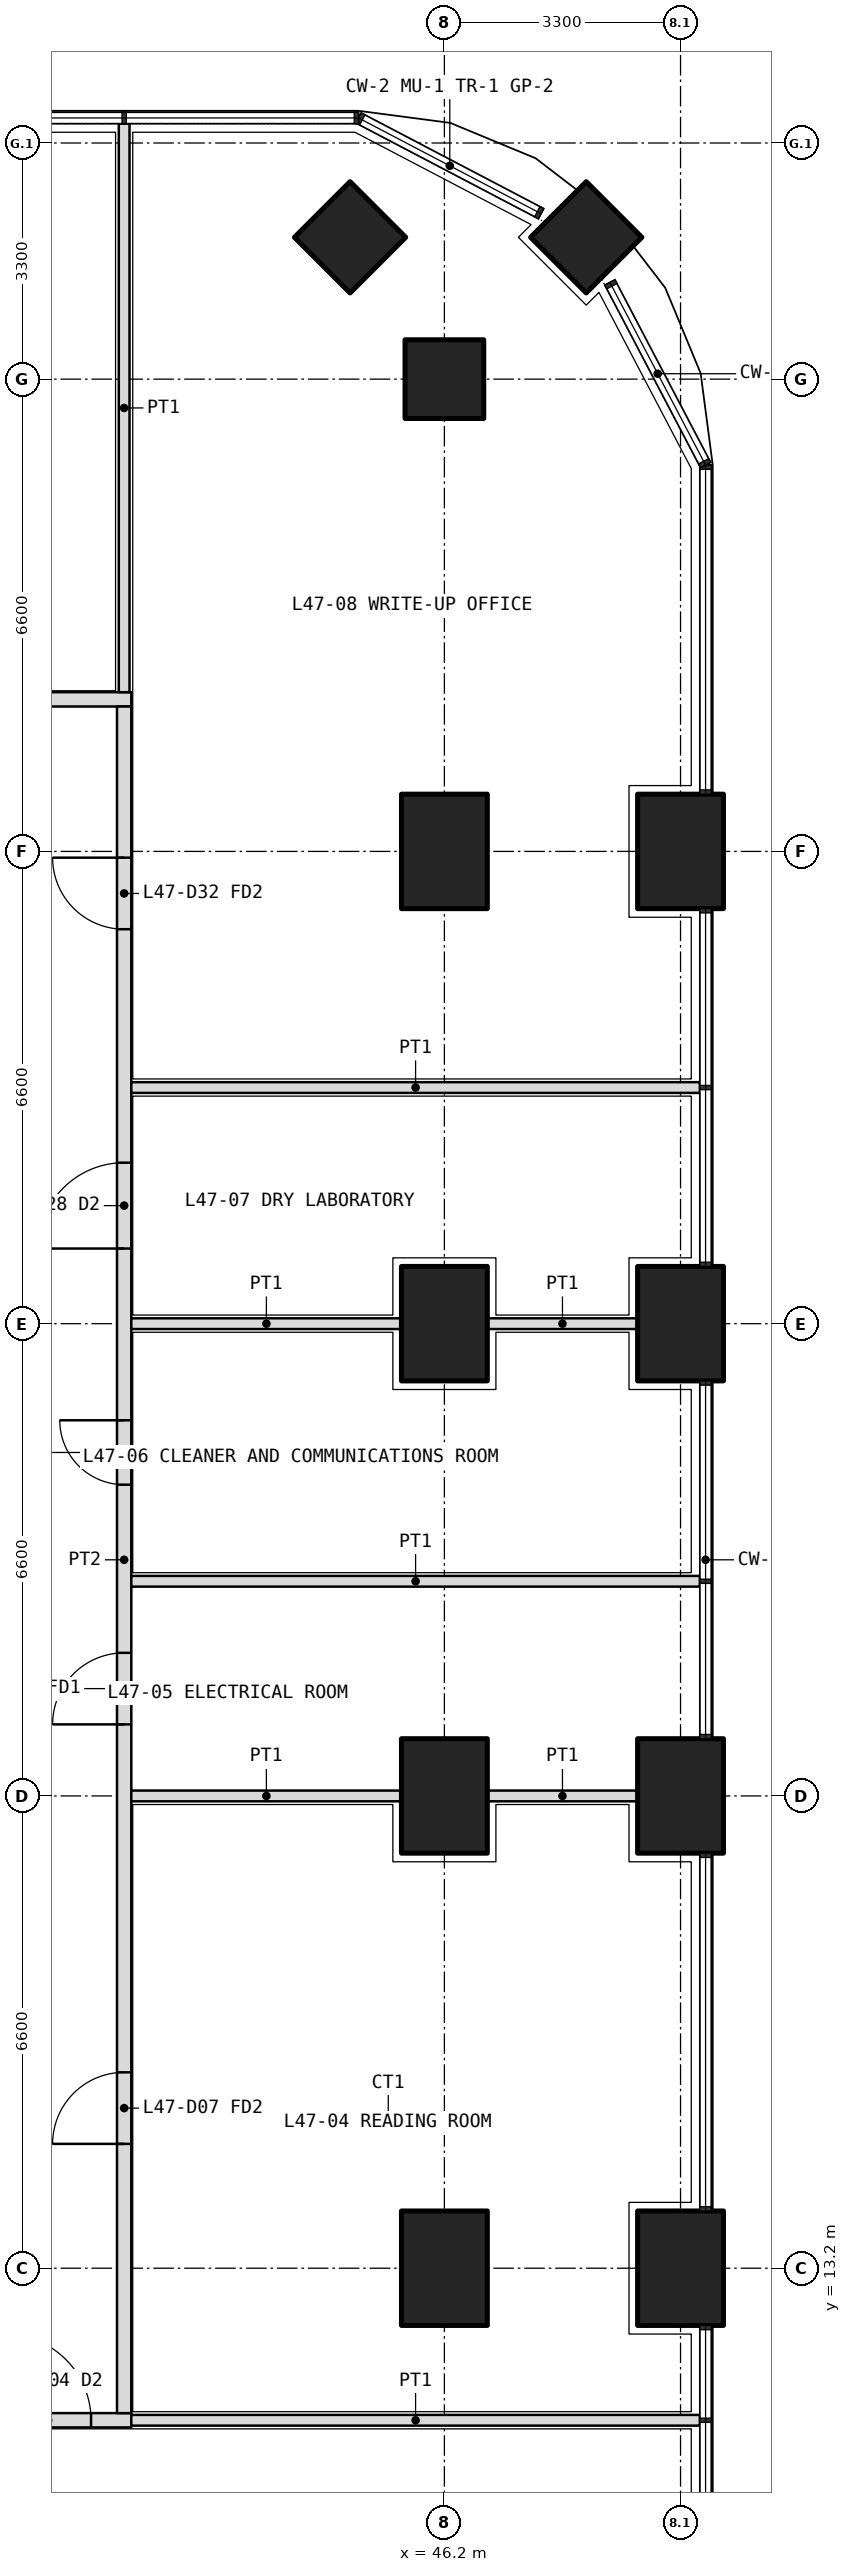
"""IFC4 building model, lengths in metres.
Left out: names, types, materials, properties, quantities, classifications, styles, units other than length and angle.
Written with IfcOpenShell. Run it as: python <this file> out.ifc"""

import sys

from ifc_helpers import new_model, si_unit, direction, frame, frame_2d, origin, origin_2d, place, context, subcontext, project, spatial, rectangle, extrude, element, fill, save


model = new_model("IFC4")
c1 = context("Model", 3, precision=1e-05, world=origin(), true_north=direction((0.0, 1.0)))
c2 = subcontext(c1, "Body", "Model", "MODEL_VIEW")
j1 = project(units=[si_unit("LENGTHUNIT", "METRE"), si_unit("PLANEANGLEUNIT", "RADIAN")], contexts=[c1])
p1 = place(None, origin())
s1 = spatial("IfcSite", under=j1, at=p1, CompositionType="ELEMENT")
p2 = place(p1, origin())
s2 = spatial("IfcBuilding", under=s1, at=p2, CompositionType="ELEMENT")
p3 = place(p2, frame((0.0, 0.0, 206.1)))
s3 = spatial("IfcBuildingStorey", under=s2, at=p3, CompositionType="ELEMENT", Elevation=206.1)
p4 = place(p3, frame((48.182, 41.582, 0.0), z_axis=(0.0, 0.0, 1.0), x_axis=(0.707106781187, 0.707106781187, 0.0)))
e1 = element("IfcColumn", 1, at=p4, inside=s3, PredefinedType="COLUMN", context=c2, shape_type="SweptSolid", body=[
    extrude(rectangle(XDim=1.1, YDim=1.1, at=origin_2d()), origin(), (0.0, 0.0, 1.0), 4.2),
])
for number, where, z_axis, x_axis in (
    (2, (49.5, 13.2, 0.0), (0.0, 0.0, 1.0), (0.0, 1.0, 0.0)),
    (3, (49.5, 19.8, 0.0), (0.0, 0.0, 1.0), (0.0, 1.0, 0.0)),
    (4, (49.5, 26.4, 0.0), (0.0, 0.0, 1.0), (0.0, 1.0, 0.0)),
    (5, (49.5, 33.0, 0.0), (0.0, 0.0, 1.0), (0.0, 1.0, 0.0)),
):
    element("IfcColumn", number, at=place(p3, frame(where, z_axis=z_axis, x_axis=x_axis)), inside=s3, PredefinedType="COLUMN", context=c2, shape_type="SweptSolid", body=[
        extrude(rectangle(XDim=1.6, YDim=1.2, at=origin_2d()), origin(), (0.0, 0.0, 1.0), 4.2),
    ])
for number, where, z_axis, x_axis in (
    (6, (46.2, 39.6, 0.0), (0.0, 0.0, 1.0), (1.0, 0.0, 0.0)),
    (7, (44.882, 41.582, 0.0), (0.0, 0.0, 1.0), (0.707, 0.707, 0.0)),
):
    element("IfcColumn", number, at=place(p3, frame(where, z_axis=z_axis, x_axis=x_axis)), inside=s3, PredefinedType="COLUMN", context=c2, shape_type="SweptSolid", body=[
        extrude(rectangle(XDim=1.1, YDim=1.1, at=origin_2d()), origin(), (0.0, 0.0, 1.0), 4.2),
    ])
for number, where, z_axis, x_axis in (
    (8, (46.2, 13.2, 0.0), (0.0, 0.0, 1.0), (0.0, 1.0, 0.0)),
    (9, (46.2, 19.8, 0.0), (0.0, 0.0, 1.0), (0.0, 1.0, 0.0)),
    (10, (46.2, 26.4, 0.0), (0.0, 0.0, 1.0), (0.0, 1.0, 0.0)),
    (11, (46.2, 33.0, 0.0), (0.0, 0.0, 1.0), (0.0, 1.0, 0.0)),
):
    element("IfcColumn", number, at=place(p3, frame(where, z_axis=z_axis, x_axis=x_axis)), inside=s3, PredefinedType="COLUMN", context=c2, shape_type="SweptSolid", body=[
        extrude(rectangle(XDim=1.6, YDim=1.2, at=origin_2d()), origin(), (0.0, 0.0, 1.0), 4.2),
    ])
p5 = place(p3, frame((10.975, 11.075, 0.0), z_axis=(0.0, 0.0, 1.0), x_axis=(1.0, 0.0, 0.0)))
e12 = element("IfcWall", 12, at=p5, inside=s3, PredefinedType="PARTITIONING", context=c2, shape_type="SweptSolid", body=[
    extrude(rectangle(XDim=30.85, YDim=0.2, at=frame_2d((15.425, 0.0))), origin(), (0.0, 0.0, 1.0), 2.85),
])
p6 = place(p5, frame((2.212, 0.0, 0.0)))
e13 = element("IfcOpeningElement", 13, at=p6, cuts=e12, PredefinedType="OPENING", context=c2, shape_type="SweptSolid", body=[
    extrude(rectangle(XDim=1.2, YDim=2.1, at=frame_2d((0.6, 1.05))), frame((0.0, 0.11, 0.0), z_axis=(0.0, -1.0, 0.0), x_axis=(1.0, 0.0, 0.0)), (0.0, 0.0, 1.0), 0.22),
])
p7 = place(p5, frame((16.475, 0.0, 0.0)))
e14 = element("IfcOpeningElement", 14, at=p7, cuts=e12, PredefinedType="OPENING", context=c2, shape_type="SweptSolid", body=[
    extrude(rectangle(XDim=1.2, YDim=2.1, at=frame_2d((0.6, 1.05))), frame((0.0, 0.11, 0.0), z_axis=(0.0, -1.0, 0.0), x_axis=(1.0, 0.0, 0.0)), (0.0, 0.0, 1.0), 0.22),
])
p8 = place(p5, frame((29.087, 0.0, 0.0)))
e15 = element("IfcOpeningElement", 15, at=p8, cuts=e12, PredefinedType="OPENING", context=c2, shape_type="SweptSolid", body=[
    extrude(rectangle(XDim=1.2, YDim=2.1, at=frame_2d((0.6, 1.05))), frame((0.0, 0.11, 0.0), z_axis=(0.0, -1.0, 0.0), x_axis=(1.0, 0.0, 0.0)), (0.0, 0.0, 1.0), 0.22),
])
p9 = place(p3, frame((10.975, 35.125, 0.0), z_axis=(0.0, 0.0, 1.0), x_axis=(1.0, 0.0, 0.0)))
e16 = element("IfcWall", 16, at=p9, inside=s3, PredefinedType="PARTITIONING", context=c2, shape_type="SweptSolid", body=[
    extrude(rectangle(XDim=30.85, YDim=0.2, at=frame_2d((15.425, 0.0))), origin(), (0.0, 0.0, 1.0), 2.85),
])
p10 = place(p9, frame((0.562, 0.0, 0.0)))
e17 = element("IfcOpeningElement", 17, at=p10, cuts=e16, PredefinedType="OPENING", context=c2, shape_type="SweptSolid", body=[
    extrude(rectangle(XDim=1.2, YDim=2.1, at=frame_2d((0.6, 1.05))), frame((0.0, 0.11, 0.0), z_axis=(0.0, -1.0, 0.0), x_axis=(1.0, 0.0, 0.0)), (0.0, 0.0, 1.0), 0.22),
])
p11 = place(p9, frame((3.825, 0.0, 0.0)))
e18 = element("IfcOpeningElement", 18, at=p11, cuts=e16, PredefinedType="OPENING", context=c2, shape_type="SweptSolid", body=[
    extrude(rectangle(XDim=1.0, YDim=2.1, at=frame_2d((0.5, 1.05))), frame((0.0, 0.11, 0.0), z_axis=(0.0, -1.0, 0.0), x_axis=(1.0, 0.0, 0.0)), (0.0, 0.0, 1.0), 0.22),
])
p12 = place(p9, frame((7.125, 0.0, 0.0)))
e19 = element("IfcOpeningElement", 19, at=p12, cuts=e16, PredefinedType="OPENING", context=c2, shape_type="SweptSolid", body=[
    extrude(rectangle(XDim=1.0, YDim=2.1, at=frame_2d((0.5, 1.05))), frame((0.0, 0.11, 0.0), z_axis=(0.0, -1.0, 0.0), x_axis=(1.0, 0.0, 0.0)), (0.0, 0.0, 1.0), 0.22),
])
p13 = place(p9, frame((9.975, 0.0, 0.0)))
e20 = element("IfcOpeningElement", 20, at=p13, cuts=e16, PredefinedType="OPENING", context=c2, shape_type="SweptSolid", body=[
    extrude(rectangle(XDim=1.0, YDim=2.1, at=frame_2d((0.5, 1.05))), frame((0.0, 0.11, 0.0), z_axis=(0.0, -1.0, 0.0), x_axis=(1.0, 0.0, 0.0)), (0.0, 0.0, 1.0), 0.22),
])
p14 = place(p9, frame((20.938, 0.0, 0.0)))
e21 = element("IfcOpeningElement", 21, at=p14, cuts=e16, PredefinedType="OPENING", context=c2, shape_type="SweptSolid", body=[
    extrude(rectangle(XDim=1.0, YDim=2.1, at=frame_2d((0.5, 1.05))), frame((0.0, 0.11, 0.0), z_axis=(0.0, -1.0, 0.0), x_axis=(1.0, 0.0, 0.0)), (0.0, 0.0, 1.0), 0.22),
])
p15 = place(p3, frame((41.725, 11.175, 0.0), z_axis=(0.0, 0.0, 1.0), x_axis=(0.0, 1.0, 0.0)))
e22 = element("IfcWall", 22, at=p15, inside=s3, PredefinedType="PARTITIONING", context=c2, shape_type="SweptSolid", body=[
    extrude(rectangle(XDim=23.85, YDim=0.2, at=frame_2d((11.925, 0.0))), origin(), (0.0, 0.0, 1.0), 2.85),
])
p16 = place(p15, frame((3.762, 0.0, 0.0)))
e23 = element("IfcOpeningElement", 23, at=p16, cuts=e22, PredefinedType="OPENING", context=c2, shape_type="SweptSolid", body=[
    extrude(rectangle(XDim=1.0, YDim=2.1, at=frame_2d((0.5, 1.05))), frame((0.0, 0.11, 0.0), z_axis=(0.0, -1.0, 0.0), x_axis=(1.0, 0.0, 0.0)), (0.0, 0.0, 1.0), 0.22),
])
p17 = place(p15, frame((9.625, 0.0, 0.0)))
e24 = element("IfcOpeningElement", 24, at=p17, cuts=e22, PredefinedType="OPENING", context=c2, shape_type="SweptSolid", body=[
    extrude(rectangle(XDim=1.0, YDim=2.1, at=frame_2d((0.5, 1.05))), frame((0.0, 0.11, 0.0), z_axis=(0.0, -1.0, 0.0), x_axis=(1.0, 0.0, 0.0)), (0.0, 0.0, 1.0), 0.22),
])
p18 = place(p15, frame((12.975, 0.0, 0.0)))
e25 = element("IfcOpeningElement", 25, at=p18, cuts=e22, PredefinedType="OPENING", context=c2, shape_type="SweptSolid", body=[
    extrude(rectangle(XDim=0.9, YDim=2.1, at=frame_2d((0.45, 1.05))), frame((0.0, 0.11, 0.0), z_axis=(0.0, -1.0, 0.0), x_axis=(1.0, 0.0, 0.0)), (0.0, 0.0, 1.0), 0.22),
])
p19 = place(p15, frame((16.275, 0.0, 0.0)))
e26 = element("IfcOpeningElement", 26, at=p19, cuts=e22, PredefinedType="OPENING", context=c2, shape_type="SweptSolid", body=[
    extrude(rectangle(XDim=1.2, YDim=2.1, at=frame_2d((0.6, 1.05))), frame((0.0, 0.11, 0.0), z_axis=(0.0, -1.0, 0.0), x_axis=(1.0, 0.0, 0.0)), (0.0, 0.0, 1.0), 0.22),
])
p20 = place(p15, frame((20.738, 0.0, 0.0)))
e27 = element("IfcOpeningElement", 27, at=p20, cuts=e22, PredefinedType="OPENING", context=c2, shape_type="SweptSolid", body=[
    extrude(rectangle(XDim=1.0, YDim=2.1, at=frame_2d((0.5, 1.05))), frame((0.0, 0.11, 0.0), z_axis=(0.0, -1.0, 0.0), x_axis=(1.0, 0.0, 0.0)), (0.0, 0.0, 1.0), 0.22),
])
p21 = place(p3, frame((49.77, 11.075, 0.0), z_axis=(0.0, 0.0, 1.0), x_axis=(-1.0, 0.0, 0.0)))
e28 = element("IfcWall", 28, at=p21, inside=s3, PredefinedType="PARTITIONING", context=c2, shape_type="SweptSolid", body=[
    extrude(rectangle(XDim=7.945, YDim=0.15, at=frame_2d((3.973, 0.0))), origin(), (0.0, 0.0, 1.0), 2.7),
])
p22 = place(p3, frame((41.725, 43.17, 0.0), z_axis=(0.0, 0.0, 1.0), x_axis=(0.0, -1.0, 0.0)))
e29 = element("IfcWall", 29, at=p22, inside=s3, PredefinedType="PARTITIONING", context=c2, shape_type="SweptSolid", body=[
    extrude(rectangle(XDim=7.945, YDim=0.15, at=frame_2d((3.972, 0.0))), origin(), (0.0, 0.0, 1.0), 2.7),
])
p23 = place(p3, frame((49.77, 22.8, 0.0), z_axis=(0.0, 0.0, 1.0), x_axis=(-1.0, 0.0, 0.0)))
e30 = element("IfcWall", 30, at=p23, inside=s3, PredefinedType="PARTITIONING", context=c2, shape_type="SweptSolid", body=[
    extrude(rectangle(XDim=7.945, YDim=0.15, at=frame_2d((3.973, 0.0))), origin(), (0.0, 0.0, 1.0), 2.7),
])
p24 = place(p3, frame((48.9, 26.4, 0.0), z_axis=(0.0, 0.0, 1.0), x_axis=(-1.0, 0.0, 0.0)))
e31 = element("IfcWall", 31, at=p24, inside=s3, PredefinedType="PARTITIONING", context=c2, shape_type="SweptSolid", body=[
    extrude(rectangle(XDim=2.1, YDim=0.15, at=frame_2d((1.05, 0.0))), origin(), (0.0, 0.0, 1.0), 2.85),
])
p25 = place(p3, frame((45.6, 26.4, 0.0), z_axis=(0.0, 0.0, 1.0), x_axis=(-1.0, 0.0, 0.0)))
e32 = element("IfcWall", 32, at=p25, inside=s3, PredefinedType="PARTITIONING", context=c2, shape_type="SweptSolid", body=[
    extrude(rectangle(XDim=3.775, YDim=0.15, at=frame_2d((1.888, 0.0))), origin(), (0.0, 0.0, 1.0), 2.85),
])
p26 = place(p3, frame((48.9, 19.8, 0.0), z_axis=(0.0, 0.0, 1.0), x_axis=(-1.0, 0.0, 0.0)))
e33 = element("IfcWall", 33, at=p26, inside=s3, PredefinedType="PARTITIONING", context=c2, shape_type="SweptSolid", body=[
    extrude(rectangle(XDim=2.1, YDim=0.15, at=frame_2d((1.05, 0.0))), origin(), (0.0, 0.0, 1.0), 2.85),
])
p27 = place(p3, frame((45.6, 19.8, 0.0), z_axis=(0.0, 0.0, 1.0), x_axis=(-1.0, 0.0, 0.0)))
e34 = element("IfcWall", 34, at=p27, inside=s3, PredefinedType="PARTITIONING", context=c2, shape_type="SweptSolid", body=[
    extrude(rectangle(XDim=3.775, YDim=0.15, at=frame_2d((1.888, 0.0))), origin(), (0.0, 0.0, 1.0), 2.85),
])
p28 = place(p3, frame((49.77, 29.7, 0.0), z_axis=(0.0, 0.0, 1.0), x_axis=(-1.0, 0.0, 0.0)))
e35 = element("IfcWall", 35, at=p28, inside=s3, PredefinedType="PARTITIONING", context=c2, shape_type="SweptSolid", body=[
    extrude(rectangle(XDim=7.945, YDim=0.15, at=frame_2d((3.973, 0.0))), origin(), (0.0, 0.0, 1.0), 2.7),
])
p29 = place(p8, origin())
e36 = element("IfcDoor", 36, at=p29, inside=s3, OperationType="DOUBLE_DOOR_SINGLE_SWING", PredefinedType="DOOR", context=c2, shape_type="SweptSolid", body=[
    extrude(rectangle(XDim=1.2, YDim=2.1, at=frame_2d((0.6, 1.05))), frame((0.0, 0.025, 0.0), z_axis=(0.0, -1.0, 0.0), x_axis=(1.0, 0.0, 0.0)), (0.0, 0.0, 1.0), 0.05),
])
fill(e15, e36)
p30 = place(p16, origin())
e37 = element("IfcDoor", 37, at=p30, inside=s3, OperationType="SINGLE_SWING_LEFT", PredefinedType="DOOR", context=c2, shape_type="SweptSolid", body=[
    extrude(rectangle(XDim=1.0, YDim=2.1, at=frame_2d((0.5, 1.05))), frame((0.0, 0.025, 0.0), z_axis=(0.0, -1.0, 0.0), x_axis=(1.0, 0.0, 0.0)), (0.0, 0.0, 1.0), 0.05),
])
fill(e23, e37)
p31 = place(p17, origin())
e38 = element("IfcDoor", 38, at=p31, inside=s3, OperationType="SINGLE_SWING_LEFT", PredefinedType="DOOR", context=c2, shape_type="SweptSolid", body=[
    extrude(rectangle(XDim=1.0, YDim=2.1, at=frame_2d((0.5, 1.05))), frame((0.0, 0.025, 0.0), z_axis=(0.0, -1.0, 0.0), x_axis=(1.0, 0.0, 0.0)), (0.0, 0.0, 1.0), 0.05),
])
fill(e24, e38)
p32 = place(p18, origin())
e39 = element("IfcDoor", 39, at=p32, inside=s3, OperationType="SINGLE_SWING_RIGHT", PredefinedType="DOOR", context=c2, shape_type="SweptSolid", body=[
    extrude(rectangle(XDim=0.9, YDim=2.1, at=frame_2d((0.45, 1.05))), frame((0.0, 0.025, 0.0), z_axis=(0.0, -1.0, 0.0), x_axis=(1.0, 0.0, 0.0)), (0.0, 0.0, 1.0), 0.05),
])
fill(e25, e39)
p33 = place(p19, origin())
e40 = element("IfcDoor", 40, at=p33, inside=s3, OperationType="DOUBLE_DOOR_SINGLE_SWING", PredefinedType="DOOR", context=c2, shape_type="SweptSolid", body=[
    extrude(rectangle(XDim=1.2, YDim=2.1, at=frame_2d((0.6, 1.05))), frame((0.0, 0.025, 0.0), z_axis=(0.0, -1.0, 0.0), x_axis=(1.0, 0.0, 0.0)), (0.0, 0.0, 1.0), 0.05),
])
fill(e26, e40)
p34 = place(p20, origin())
e41 = element("IfcDoor", 41, at=p34, inside=s3, OperationType="SINGLE_SWING_RIGHT", PredefinedType="DOOR", context=c2, shape_type="SweptSolid", body=[
    extrude(rectangle(XDim=1.0, YDim=2.1, at=frame_2d((0.5, 1.05))), frame((0.0, 0.025, 0.0), z_axis=(0.0, -1.0, 0.0), x_axis=(1.0, 0.0, 0.0)), (0.0, 0.0, 1.0), 0.05),
])
fill(e27, e41)
save(model, sys.argv[1])
